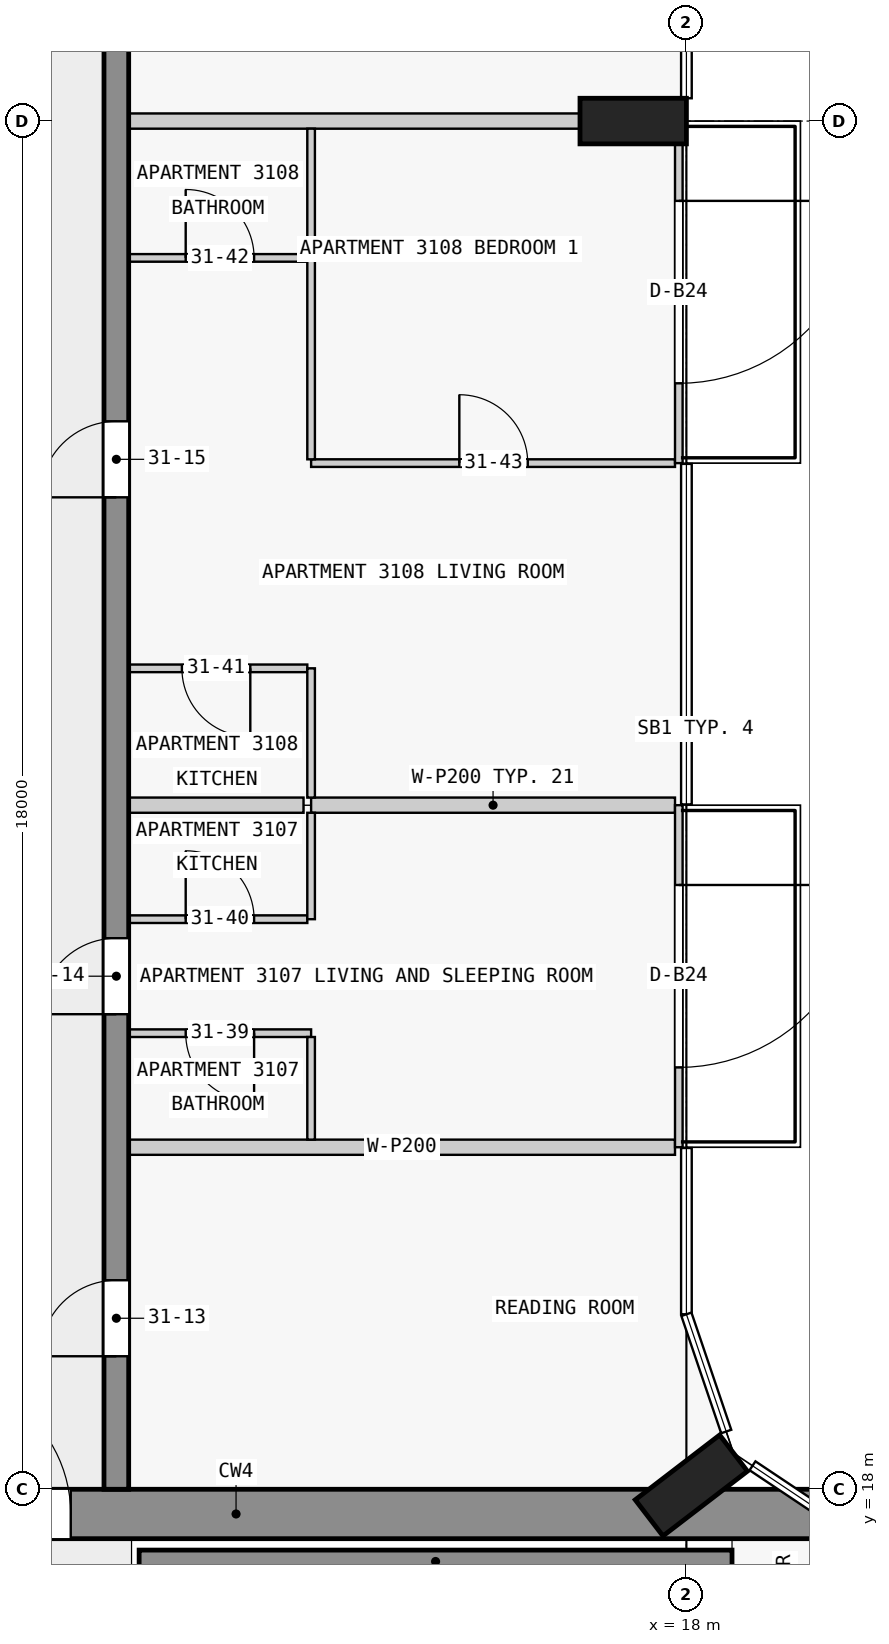
"""IFC4 building model, lengths in metres.
Left out: names, types, materials, properties, quantities, classifications, styles, units other than length and angle.
Written with IfcOpenShell. Run it as: python <this file> out.ifc"""

import sys

from ifc_helpers import new_model, si_unit, direction, frame, frame_2d, origin, origin_2d, place, context, subcontext, project, spatial, rectangle, extrude, element, fill, save


model = new_model("IFC4")
c1 = context("Model", 3, precision=1e-05, world=origin(), true_north=direction((0.0, 1.0)))
c2 = subcontext(c1, "Body", "Model", "MODEL_VIEW")
j1 = project(units=[si_unit("LENGTHUNIT", "METRE"), si_unit("PLANEANGLEUNIT", "RADIAN")], contexts=[c1])
p1 = place(None, origin())
s1 = spatial("IfcSite", under=j1, at=p1, CompositionType="ELEMENT")
p2 = place(p1, origin())
s2 = spatial("IfcBuilding", under=s1, at=p2, CompositionType="ELEMENT")
p3 = place(p2, frame((0.0, 0.0, 120.3)))
s3 = spatial("IfcBuildingStorey", under=s2, at=p3, CompositionType="ELEMENT", Elevation=120.3)
for number, where, z_axis, x_axis in (
    (1, (18.065, 18.05, 0.0), (0.0, 0.0, 1.0), (-0.609, 0.793, 0.0)),
    (2, (17.3, 36.0, 0.0), (0.0, 0.0, 1.0), (0.0, 1.0, 0.0)),
):
    element("IfcColumn", number, at=place(p3, frame(where, z_axis=z_axis, x_axis=x_axis)), inside=s3, PredefinedType="COLUMN", context=c2, shape_type="SweptSolid", body=[
        extrude(rectangle(XDim=0.6, YDim=1.4, at=origin_2d()), origin(), (0.0, 0.0, 1.0), 3.5),
    ])
p4 = place(p3, frame((1.65, 17.675, 0.0), z_axis=(0.0, 0.0, 1.0), x_axis=(1.0, 0.0, 0.0)))
e3 = element("IfcWall", 3, at=p4, inside=s3, PredefinedType="SHEAR", context=c2, shape_type="SweptSolid", body=[
    extrude(rectangle(XDim=20.85, YDim=0.65, at=frame_2d((10.425, 0.0))), origin(), (0.0, 0.0, 1.0), 3.2),
])
p5 = place(p4, frame((6.45, 0.0, 0.0)))
e4 = element("IfcOpeningElement", 4, at=p5, cuts=e3, PredefinedType="OPENING", context=c2, shape_type="SweptSolid", body=[
    extrude(rectangle(XDim=1.8, YDim=2.1, at=frame_2d((0.9, 1.05))), frame((0.0, 0.335, 0.0), z_axis=(0.0, -1.0, 0.0), x_axis=(1.0, 0.0, 0.0)), (0.0, 0.0, 1.0), 0.67),
])
p6 = place(p3, frame((10.8, 17.05, 0.0), z_axis=(0.0, 0.0, 1.0), x_axis=(1.0, 0.0, 0.0)))
e5 = element("IfcWall", 5, at=p6, inside=s3, PredefinedType="SHEAR", context=c2, shape_type="SweptSolid", body=[
    extrude(rectangle(XDim=7.8, YDim=0.3, at=frame_2d((3.9, 0.0))), origin(), (0.0, 0.0, 1.0), 3.2),
])
p7 = place(p3, frame((10.5, 18.0, 0.0), z_axis=(0.0, 0.0, 1.0), x_axis=(0.0, 1.0, 0.0)))
e6 = element("IfcWall", 6, at=p7, inside=s3, PredefinedType="SHEAR", context=c2, shape_type="SweptSolid", body=[
    extrude(rectangle(XDim=27.0, YDim=0.325, at=frame_2d((13.5, 0.0))), origin(), (0.0, 0.0, 1.0), 3.2),
])
p8 = place(p7, frame((1.75, 0.0, 0.0)))
e7 = element("IfcOpeningElement", 7, at=p8, cuts=e6, PredefinedType="OPENING", context=c2, shape_type="SweptSolid", body=[
    extrude(rectangle(XDim=1.0, YDim=2.1, at=frame_2d((0.5, 1.05))), frame((0.0, 0.172, 0.0), z_axis=(0.0, -1.0, 0.0), x_axis=(1.0, 0.0, 0.0)), (0.0, 0.0, 1.0), 0.345),
])
p9 = place(p7, frame((6.25, 0.0, 0.0)))
e8 = element("IfcOpeningElement", 8, at=p9, cuts=e6, PredefinedType="OPENING", context=c2, shape_type="SweptSolid", body=[
    extrude(rectangle(XDim=1.0, YDim=2.1, at=frame_2d((0.5, 1.05))), frame((0.0, 0.172, 0.0), z_axis=(0.0, -1.0, 0.0), x_axis=(1.0, 0.0, 0.0)), (0.0, 0.0, 1.0), 0.345),
])
p10 = place(p7, frame((13.05, 0.0, 0.0)))
e9 = element("IfcOpeningElement", 9, at=p10, cuts=e6, PredefinedType="OPENING", context=c2, shape_type="SweptSolid", body=[
    extrude(rectangle(XDim=1.0, YDim=2.1, at=frame_2d((0.5, 1.05))), frame((0.0, 0.172, 0.0), z_axis=(0.0, -1.0, 0.0), x_axis=(1.0, 0.0, 0.0)), (0.0, 0.0, 1.0), 0.345),
])
p11 = place(p7, frame((19.75, 0.0, 0.0)))
e10 = element("IfcOpeningElement", 10, at=p11, cuts=e6, PredefinedType="OPENING", context=c2, shape_type="SweptSolid", body=[
    extrude(rectangle(XDim=1.0, YDim=2.1, at=frame_2d((0.5, 1.05))), frame((0.0, 0.172, 0.0), z_axis=(0.0, -1.0, 0.0), x_axis=(1.0, 0.0, 0.0)), (0.0, 0.0, 1.0), 0.345),
])
p12 = place(p7, frame((23.25, 0.0, 0.0)))
e11 = element("IfcOpeningElement", 11, at=p12, cuts=e6, PredefinedType="OPENING", context=c2, shape_type="SweptSolid", body=[
    extrude(rectangle(XDim=0.9, YDim=2.1, at=frame_2d((0.45, 1.05))), frame((0.0, 0.172, 0.0), z_axis=(0.0, -1.0, 0.0), x_axis=(1.0, 0.0, 0.0)), (0.0, 0.0, 1.0), 0.345),
])
p13 = place(p7, frame((25.45, 0.0, 0.0)))
e12 = element("IfcOpeningElement", 12, at=p13, cuts=e6, PredefinedType="OPENING", context=c2, shape_type="SweptSolid", body=[
    extrude(rectangle(XDim=1.0, YDim=2.1, at=frame_2d((0.5, 1.05))), frame((0.0, 0.172, 0.0), z_axis=(0.0, -1.0, 0.0), x_axis=(1.0, 0.0, 0.0)), (0.0, 0.0, 1.0), 0.345),
])
p14 = place(p3, frame((17.9, 27.0, 0.0), z_axis=(0.0, 0.0, 1.0), x_axis=(0.0, -1.0, 0.0)))
e13 = element("IfcWall", 13, at=p14, inside=s3, PredefinedType="STANDARD", context=c2, shape_type="SweptSolid", body=[
    extrude(rectangle(XDim=4.5, YDim=0.1, at=frame_2d((2.25, 0.0))), origin(), (0.0, 0.0, 1.0), 3.2),
])
p15 = place(p14, frame((1.05, 0.0, 0.0)))
e14 = element("IfcOpeningElement", 14, at=p15, cuts=e13, PredefinedType="OPENING", context=c2, shape_type="SweptSolid", body=[
    extrude(rectangle(XDim=2.4, YDim=2.4, at=frame_2d((1.2, 1.2))), frame((0.0, 0.06, 0.0), z_axis=(0.0, -1.0, 0.0), x_axis=(1.0, 0.0, 0.0)), (0.0, 0.0, 1.0), 0.12),
])
p16 = place(p3, frame((17.9, 36.0, 0.0), z_axis=(0.0, 0.0, 1.0), x_axis=(0.0, -1.0, 0.0)))
e15 = element("IfcWall", 15, at=p16, inside=s3, PredefinedType="STANDARD", context=c2, shape_type="SweptSolid", body=[
    extrude(rectangle(XDim=4.5, YDim=0.1, at=frame_2d((2.25, 0.0))), origin(), (0.0, 0.0, 1.0), 3.2),
])
p17 = place(p16, frame((1.05, 0.0, 0.0)))
e16 = element("IfcOpeningElement", 16, at=p17, cuts=e15, PredefinedType="OPENING", context=c2, shape_type="SweptSolid", body=[
    extrude(rectangle(XDim=2.4, YDim=2.4, at=frame_2d((1.2, 1.2))), frame((0.0, 0.06, 0.0), z_axis=(0.0, -1.0, 0.0), x_axis=(1.0, 0.0, 0.0)), (0.0, 0.0, 1.0), 0.12),
])
p18 = place(p3, frame((17.85, 22.5, 0.0), z_axis=(0.0, 0.0, 1.0), x_axis=(-1.0, 0.0, 0.0)))
e17 = element("IfcWall", 17, at=p18, inside=s3, PredefinedType="PARTITIONING", context=c2, shape_type="SweptSolid", body=[
    extrude(rectangle(XDim=7.188, YDim=0.2, at=frame_2d((3.594, 0.0))), origin(), (0.0, 0.0, 1.0), 3.2),
])
p19 = place(p3, frame((13.062, 24.0, 0.0), z_axis=(0.0, 0.0, 1.0), x_axis=(-1.0, 0.0, 0.0)))
e18 = element("IfcWall", 18, at=p19, inside=s3, PredefinedType="PARTITIONING", context=c2, shape_type="SweptSolid", body=[
    extrude(rectangle(XDim=2.4, YDim=0.1, at=frame_2d((1.2, 0.0))), origin(), (0.0, 0.0, 1.0), 3.2),
])
p20 = place(p19, frame((0.75, 0.0, 0.0)))
e19 = element("IfcOpeningElement", 19, at=p20, cuts=e18, PredefinedType="OPENING", context=c2, shape_type="SweptSolid", body=[
    extrude(rectangle(XDim=0.9, YDim=2.1, at=frame_2d((0.45, 1.05))), frame((0.0, 0.06, 0.0), z_axis=(0.0, -1.0, 0.0), x_axis=(1.0, 0.0, 0.0)), (0.0, 0.0, 1.0), 0.12),
])
p21 = place(p3, frame((10.663, 25.5, 0.0), z_axis=(0.0, 0.0, 1.0), x_axis=(1.0, 0.0, 0.0)))
e20 = element("IfcWall", 20, at=p21, inside=s3, PredefinedType="PARTITIONING", context=c2, shape_type="SweptSolid", body=[
    extrude(rectangle(XDim=2.35, YDim=0.1, at=frame_2d((1.175, 0.0))), origin(), (0.0, 0.0, 1.0), 3.2),
])
p22 = place(p21, frame((0.75, 0.0, 0.0)))
e21 = element("IfcOpeningElement", 21, at=p22, cuts=e20, PredefinedType="OPENING", context=c2, shape_type="SweptSolid", body=[
    extrude(rectangle(XDim=0.9, YDim=2.1, at=frame_2d((0.45, 1.05))), frame((0.0, 0.06, 0.0), z_axis=(0.0, -1.0, 0.0), x_axis=(1.0, 0.0, 0.0)), (0.0, 0.0, 1.0), 0.12),
])
p23 = place(p3, frame((12.962, 27.0, 0.0), z_axis=(0.0, 0.0, 1.0), x_axis=(-1.0, 0.0, 0.0)))
e22 = element("IfcWall", 22, at=p23, inside=s3, PredefinedType="PARTITIONING", context=c2, shape_type="SweptSolid", body=[
    extrude(rectangle(XDim=2.3, YDim=0.2, at=frame_2d((1.15, 0.0))), origin(), (0.0, 0.0, 1.0), 3.2),
])
p24 = place(p3, frame((13.062, 27.0, 0.0), z_axis=(0.0, 0.0, 1.0), x_axis=(1.0, 0.0, 0.0)))
e23 = element("IfcWall", 23, at=p24, inside=s3, PredefinedType="PARTITIONING", context=c2, shape_type="SweptSolid", body=[
    extrude(rectangle(XDim=4.788, YDim=0.2, at=frame_2d((2.394, 0.0))), origin(), (0.0, 0.0, 1.0), 3.2),
])
p25 = place(p3, frame((13.012, 28.8, 0.0), z_axis=(0.0, 0.0, 1.0), x_axis=(-1.0, 0.0, 0.0)))
e24 = element("IfcWall", 24, at=p25, inside=s3, PredefinedType="PARTITIONING", context=c2, shape_type="SweptSolid", body=[
    extrude(rectangle(XDim=2.35, YDim=0.1, at=frame_2d((1.175, 0.0))), origin(), (0.0, 0.0, 1.0), 3.2),
])
p26 = place(p25, frame((0.75, 0.0, 0.0)))
e25 = element("IfcOpeningElement", 25, at=p26, cuts=e24, PredefinedType="OPENING", context=c2, shape_type="SweptSolid", body=[
    extrude(rectangle(XDim=0.9, YDim=2.1, at=frame_2d((0.45, 1.05))), frame((0.0, 0.06, 0.0), z_axis=(0.0, -1.0, 0.0), x_axis=(1.0, 0.0, 0.0)), (0.0, 0.0, 1.0), 0.12),
])
p27 = place(p3, frame((13.062, 31.5, 0.0), z_axis=(0.0, 0.0, 1.0), x_axis=(1.0, 0.0, 0.0)))
e26 = element("IfcWall", 26, at=p27, inside=s3, PredefinedType="PARTITIONING", context=c2, shape_type="SweptSolid", body=[
    extrude(rectangle(XDim=4.788, YDim=0.1, at=frame_2d((2.394, 0.0))), origin(), (0.0, 0.0, 1.0), 3.2),
])
p28 = place(p27, frame((1.95, 0.0, 0.0)))
e27 = element("IfcOpeningElement", 27, at=p28, cuts=e26, PredefinedType="OPENING", context=c2, shape_type="SweptSolid", body=[
    extrude(rectangle(XDim=0.9, YDim=2.1, at=frame_2d((0.45, 1.05))), frame((0.0, 0.06, 0.0), z_axis=(0.0, -1.0, 0.0), x_axis=(1.0, 0.0, 0.0)), (0.0, 0.0, 1.0), 0.12),
])
p29 = place(p3, frame((10.663, 34.2, 0.0), z_axis=(0.0, 0.0, 1.0), x_axis=(1.0, 0.0, 0.0)))
e28 = element("IfcWall", 28, at=p29, inside=s3, PredefinedType="PARTITIONING", context=c2, shape_type="SweptSolid", body=[
    extrude(rectangle(XDim=2.35, YDim=0.1, at=frame_2d((1.175, 0.0))), origin(), (0.0, 0.0, 1.0), 3.2),
])
p30 = place(p29, frame((0.75, 0.0, 0.0)))
e29 = element("IfcOpeningElement", 29, at=p30, cuts=e28, PredefinedType="OPENING", context=c2, shape_type="SweptSolid", body=[
    extrude(rectangle(XDim=0.9, YDim=2.1, at=frame_2d((0.45, 1.05))), frame((0.0, 0.06, 0.0), z_axis=(0.0, -1.0, 0.0), x_axis=(1.0, 0.0, 0.0)), (0.0, 0.0, 1.0), 0.12),
])
p31 = place(p3, frame((16.6, 36.0, 0.0), z_axis=(0.0, 0.0, 1.0), x_axis=(-1.0, 0.0, 0.0)))
e30 = element("IfcWall", 30, at=p31, inside=s3, PredefinedType="PARTITIONING", context=c2, shape_type="SweptSolid", body=[
    extrude(rectangle(XDim=5.938, YDim=0.2, at=frame_2d((2.969, 0.0))), origin(), (0.0, 0.0, 1.0), 3.2),
])
p32 = place(p3, frame((13.062, 34.2, 0.0), z_axis=(0.0, 0.0, 1.0), x_axis=(0.0, -1.0, 0.0)))
e31 = element("IfcWall", 31, at=p32, inside=s3, PredefinedType="PARTITIONING", context=c2, shape_type="SweptSolid", body=[
    extrude(rectangle(XDim=2.65, YDim=0.1, at=frame_2d((1.325, 0.0))), origin(), (0.0, 0.0, 1.0), 3.2),
])
p33 = place(p3, frame((13.062, 22.6, 0.0), z_axis=(0.0, 0.0, 1.0), x_axis=(0.0, 1.0, 0.0)))
e32 = element("IfcWall", 32, at=p33, inside=s3, PredefinedType="PARTITIONING", context=c2, shape_type="SweptSolid", body=[
    extrude(rectangle(XDim=1.35, YDim=0.1, at=frame_2d((0.675, 0.0))), origin(), (0.0, 0.0, 1.0), 3.2),
])
p34 = place(p3, frame((13.062, 25.5, 0.0), z_axis=(0.0, 0.0, 1.0), x_axis=(0.0, 1.0, 0.0)))
e33 = element("IfcWall", 33, at=p34, inside=s3, PredefinedType="PARTITIONING", context=c2, shape_type="SweptSolid", body=[
    extrude(rectangle(XDim=1.4, YDim=0.1, at=frame_2d((0.7, 0.0))), origin(), (0.0, 0.0, 1.0), 3.2),
])
p35 = place(p3, frame((13.062, 27.1, 0.0), z_axis=(0.0, 0.0, 1.0), x_axis=(0.0, 1.0, 0.0)))
e34 = element("IfcWall", 34, at=p35, inside=s3, PredefinedType="PARTITIONING", context=c2, shape_type="SweptSolid", body=[
    extrude(rectangle(XDim=1.7, YDim=0.1, at=frame_2d((0.85, 0.0))), origin(), (0.0, 0.0, 1.0), 3.2),
])
p36 = place(p3, frame((13.062, 34.25, 0.0), z_axis=(0.0, 0.0, 1.0), x_axis=(0.0, 1.0, 0.0)))
e35 = element("IfcWall", 35, at=p36, inside=s3, PredefinedType="PARTITIONING", context=c2, shape_type="SweptSolid", body=[
    extrude(rectangle(XDim=1.65, YDim=0.1, at=frame_2d((0.825, 0.0))), origin(), (0.0, 0.0, 1.0), 3.2),
])
p37 = place(p15, origin())
e36 = element("IfcDoor", 36, at=p37, inside=s3, OperationType="SINGLE_SWING_LEFT", PredefinedType="DOOR", context=c2, shape_type="SweptSolid", body=[
    extrude(rectangle(XDim=2.4, YDim=2.4, at=frame_2d((1.2, 1.2))), frame((0.0, 0.025, 0.0), z_axis=(0.0, -1.0, 0.0), x_axis=(1.0, 0.0, 0.0)), (0.0, 0.0, 1.0), 0.05),
])
fill(e14, e36)
p38 = place(p17, origin())
e37 = element("IfcDoor", 37, at=p38, inside=s3, OperationType="SINGLE_SWING_LEFT", PredefinedType="DOOR", context=c2, shape_type="SweptSolid", body=[
    extrude(rectangle(XDim=2.4, YDim=2.4, at=frame_2d((1.2, 1.2))), frame((0.0, 0.025, 0.0), z_axis=(0.0, -1.0, 0.0), x_axis=(1.0, 0.0, 0.0)), (0.0, 0.0, 1.0), 0.05),
])
fill(e16, e37)
p39 = place(p5, origin())
e38 = element("IfcDoor", 38, at=p39, inside=s3, OperationType="DOUBLE_DOOR_SINGLE_SWING", PredefinedType="DOOR", context=c2, shape_type="SweptSolid", body=[
    extrude(rectangle(XDim=1.8, YDim=2.1, at=frame_2d((0.9, 1.05))), frame((0.0, 0.025, 0.0), z_axis=(0.0, -1.0, 0.0), x_axis=(1.0, 0.0, 0.0)), (0.0, 0.0, 1.0), 0.05),
])
fill(e4, e38)
p40 = place(p8, origin())
e39 = element("IfcDoor", 39, at=p40, inside=s3, OperationType="SINGLE_SWING_LEFT", PredefinedType="DOOR", context=c2, shape_type="SweptSolid", body=[
    extrude(rectangle(XDim=1.0, YDim=2.1, at=frame_2d((0.5, 1.05))), frame((0.0, 0.025, 0.0), z_axis=(0.0, -1.0, 0.0), x_axis=(1.0, 0.0, 0.0)), (0.0, 0.0, 1.0), 0.05),
])
fill(e7, e39)
p41 = place(p9, origin())
e40 = element("IfcDoor", 40, at=p41, inside=s3, OperationType="SINGLE_SWING_LEFT", PredefinedType="DOOR", context=c2, shape_type="SweptSolid", body=[
    extrude(rectangle(XDim=1.0, YDim=2.1, at=frame_2d((0.5, 1.05))), frame((0.0, 0.025, 0.0), z_axis=(0.0, -1.0, 0.0), x_axis=(1.0, 0.0, 0.0)), (0.0, 0.0, 1.0), 0.05),
])
fill(e8, e40)
p42 = place(p10, origin())
e41 = element("IfcDoor", 41, at=p42, inside=s3, OperationType="SINGLE_SWING_RIGHT", PredefinedType="DOOR", context=c2, shape_type="SweptSolid", body=[
    extrude(rectangle(XDim=1.0, YDim=2.1, at=frame_2d((0.5, 1.05))), frame((0.0, 0.025, 0.0), z_axis=(0.0, -1.0, 0.0), x_axis=(1.0, 0.0, 0.0)), (0.0, 0.0, 1.0), 0.05),
])
fill(e9, e41)
p43 = place(p20, origin())
e42 = element("IfcDoor", 42, at=p43, inside=s3, OperationType="SINGLE_SWING_LEFT", PredefinedType="DOOR", context=c2, shape_type="SweptSolid", body=[
    extrude(rectangle(XDim=0.9, YDim=2.1, at=frame_2d((0.45, 1.05))), frame((0.0, 0.025, 0.0), z_axis=(0.0, -1.0, 0.0), x_axis=(1.0, 0.0, 0.0)), (0.0, 0.0, 1.0), 0.05),
])
fill(e19, e42)
p44 = place(p22, origin())
e43 = element("IfcDoor", 43, at=p44, inside=s3, OperationType="SINGLE_SWING_RIGHT", PredefinedType="DOOR", context=c2, shape_type="SweptSolid", body=[
    extrude(rectangle(XDim=0.9, YDim=2.1, at=frame_2d((0.45, 1.05))), frame((0.0, 0.025, 0.0), z_axis=(0.0, -1.0, 0.0), x_axis=(1.0, 0.0, 0.0)), (0.0, 0.0, 1.0), 0.05),
])
fill(e21, e43)
p45 = place(p26, origin())
e44 = element("IfcDoor", 44, at=p45, inside=s3, OperationType="SINGLE_SWING_RIGHT", PredefinedType="DOOR", context=c2, shape_type="SweptSolid", body=[
    extrude(rectangle(XDim=0.9, YDim=2.1, at=frame_2d((0.45, 1.05))), frame((0.0, 0.025, 0.0), z_axis=(0.0, -1.0, 0.0), x_axis=(1.0, 0.0, 0.0)), (0.0, 0.0, 1.0), 0.05),
])
fill(e25, e44)
p46 = place(p30, origin())
e45 = element("IfcDoor", 45, at=p46, inside=s3, OperationType="SINGLE_SWING_RIGHT", PredefinedType="DOOR", context=c2, shape_type="SweptSolid", body=[
    extrude(rectangle(XDim=0.9, YDim=2.1, at=frame_2d((0.45, 1.05))), frame((0.0, 0.025, 0.0), z_axis=(0.0, -1.0, 0.0), x_axis=(1.0, 0.0, 0.0)), (0.0, 0.0, 1.0), 0.05),
])
fill(e29, e45)
p47 = place(p28, origin())
e46 = element("IfcDoor", 46, at=p47, inside=s3, OperationType="SINGLE_SWING_RIGHT", PredefinedType="DOOR", context=c2, shape_type="SweptSolid", body=[
    extrude(rectangle(XDim=0.9, YDim=2.1, at=frame_2d((0.45, 1.05))), frame((0.0, 0.025, 0.0), z_axis=(0.0, -1.0, 0.0), x_axis=(1.0, 0.0, 0.0)), (0.0, 0.0, 1.0), 0.05),
])
fill(e27, e46)
save(model, sys.argv[1])
